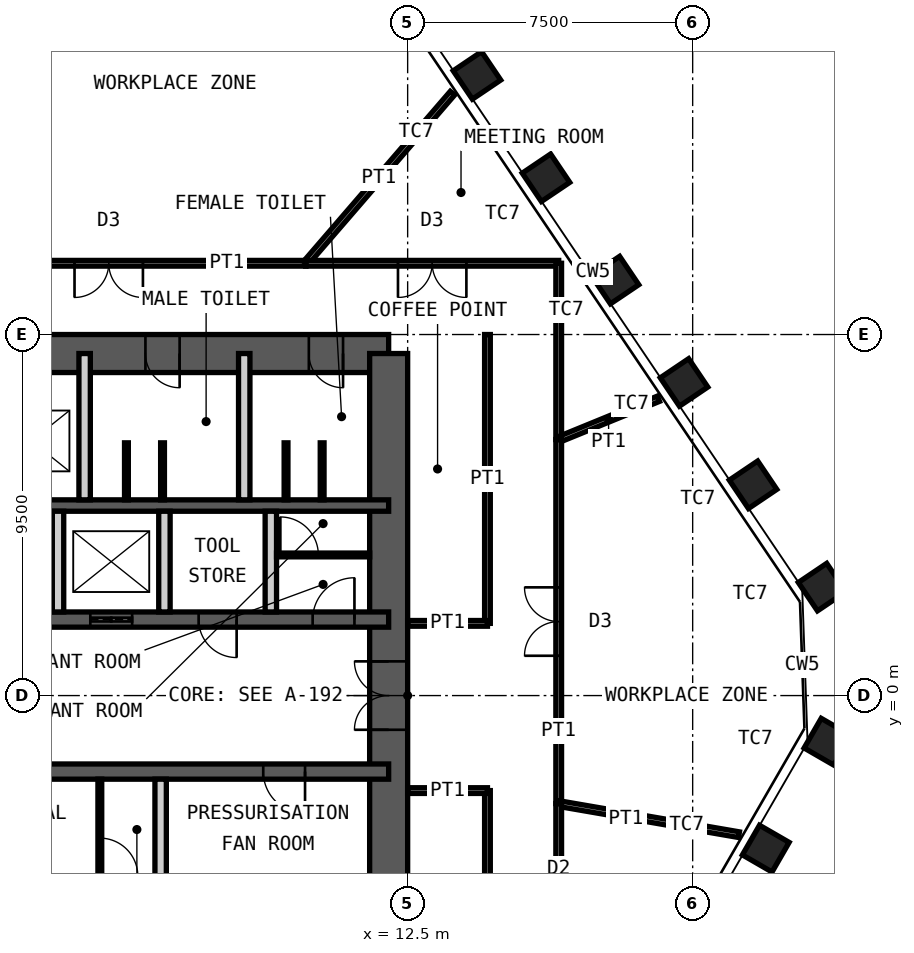
"""IFC4 building model, lengths in metres.
Left out: names, types, materials, properties, quantities, classifications, styles, units other than length and angle.
Written with IfcOpenShell. Run it as: python <this file> out.ifc"""

import sys

from ifc_helpers import new_model, si_unit, direction, frame, frame_2d, origin, origin_2d, place, context, subcontext, project, spatial, rectangle, hollow_rectangle, extrude, element, fill, save


model = new_model("IFC4")
c1 = context("Model", 3, precision=1e-05, world=origin(), true_north=direction((0.0, 1.0)))
c2 = subcontext(c1, "Body", "Model", "MODEL_VIEW")
j1 = project(units=[si_unit("LENGTHUNIT", "METRE"), si_unit("PLANEANGLEUNIT", "RADIAN")], contexts=[c1])
p1 = place(None, origin())
s1 = spatial("IfcSite", under=j1, at=p1, CompositionType="ELEMENT")
p2 = place(p1, origin())
s2 = spatial("IfcBuilding", under=s1, at=p2, CompositionType="ELEMENT")
p3 = place(p2, frame((0.0, 0.0, 266.2)))
s3 = spatial("IfcBuildingStorey", under=s2, at=p3, CompositionType="ELEMENT", Elevation=266.2)
for number, where, z_axis, x_axis in (
    (1, (14.324, 16.318, 0.0), (0.0, 0.0, 1.0), (-0.559, 0.829, 0.0)),
    (2, (16.141, 13.625, 0.0), (0.0, 0.0, 1.0), (-0.559, 0.829, 0.0)),
    (3, (17.957, 10.932, 0.0), (0.0, 0.0, 1.0), (-0.559, 0.829, 0.0)),
    (4, (19.773, 8.239, 0.0), (0.0, 0.0, 1.0), (-0.559, 0.829, 0.0)),
    (5, (21.589, 5.547, 0.0), (0.0, 0.0, 1.0), (-0.559, 0.829, 0.0)),
    (6, (23.406, 2.854, 0.0), (0.0, 0.0, 1.0), (-0.559, 0.829, 0.0)),
    (7, (23.548, -1.214, 0.0), (0.0, 0.0, 1.0), (0.5, 0.866, 0.0)),
    (8, (21.924, -4.027, 0.0), (0.0, 0.0, 1.0), (0.5, 0.866, 0.0)),
):
    element("IfcColumn", number, at=place(p3, frame(where, z_axis=z_axis, x_axis=x_axis)), inside=s3, PredefinedType="COLUMN", context=c2, shape_type="SweptSolid", body=[
        extrude(hollow_rectangle(XDim=0.9, YDim=0.9, WallThickness=0.06, at=origin_2d()), origin(), (0.0, 0.0, 1.0), 4.2),
    ])
p4 = place(p3, frame((-12.0, 9.0, 0.0), z_axis=(0.0, 0.0, 1.0), x_axis=(1.0, 0.0, 0.0)))
e9 = element("IfcWall", 9, at=p4, inside=s3, PredefinedType="SHEAR", context=c2, shape_type="SweptSolid", body=[
    extrude(rectangle(XDim=24.0, YDim=1.0, at=frame_2d((12.0, 0.0))), origin(), (0.0, 0.0, 1.0), 4.2),
])
p5 = place(p4, frame((10.4, 0.0, 0.0)))
e10 = element("IfcOpeningElement", 10, at=p5, cuts=e9, PredefinedType="OPENING", context=c2, shape_type="SweptSolid", body=[
    extrude(rectangle(XDim=1.0, YDim=2.1, at=frame_2d((0.5, 1.05))), frame((0.0, 0.51, 0.0), z_axis=(0.0, -1.0, 0.0), x_axis=(1.0, 0.0, 0.0)), (0.0, 0.0, 1.0), 1.02),
])
p6 = place(p4, frame((17.6, 0.0, 0.0)))
e11 = element("IfcOpeningElement", 11, at=p6, cuts=e9, PredefinedType="OPENING", context=c2, shape_type="SweptSolid", body=[
    extrude(rectangle(XDim=0.9, YDim=2.1, at=frame_2d((0.45, 1.05))), frame((0.0, 0.51, 0.0), z_axis=(0.0, -1.0, 0.0), x_axis=(1.0, 0.0, 0.0)), (0.0, 0.0, 1.0), 1.02),
])
p7 = place(p4, frame((21.9, 0.0, 0.0)))
e12 = element("IfcOpeningElement", 12, at=p7, cuts=e9, PredefinedType="OPENING", context=c2, shape_type="SweptSolid", body=[
    extrude(rectangle(XDim=0.9, YDim=2.1, at=frame_2d((0.45, 1.05))), frame((0.0, 0.51, 0.0), z_axis=(0.0, -1.0, 0.0), x_axis=(1.0, 0.0, 0.0)), (0.0, 0.0, 1.0), 1.02),
])
p8 = place(p3, frame((12.0, -9.0, 0.0), z_axis=(0.0, 0.0, 1.0), x_axis=(0.0, 1.0, 0.0)))
e13 = element("IfcWall", 13, at=p8, inside=s3, PredefinedType="SHEAR", context=c2, shape_type="SweptSolid", body=[
    extrude(rectangle(XDim=18.0, YDim=1.0, at=frame_2d((9.0, 0.0))), origin(), (0.0, 0.0, 1.0), 4.2),
])
p9 = place(p8, frame((8.1, 0.0, 0.0)))
e14 = element("IfcOpeningElement", 14, at=p9, cuts=e13, PredefinedType="OPENING", context=c2, shape_type="SweptSolid", body=[
    extrude(rectangle(XDim=1.8, YDim=2.1, at=frame_2d((0.9, 1.05))), frame((0.0, 0.51, 0.0), z_axis=(0.0, -1.0, 0.0), x_axis=(1.0, 0.0, 0.0)), (0.0, 0.0, 1.0), 1.02),
])
p10 = place(p3, frame((-12.0, 5.0, 0.0), z_axis=(0.0, 0.0, 1.0), x_axis=(1.0, 0.0, 0.0)))
e15 = element("IfcWall", 15, at=p10, inside=s3, PredefinedType="SHEAR", context=c2, shape_type="SweptSolid", body=[
    extrude(rectangle(XDim=24.0, YDim=0.3, at=frame_2d((12.0, 0.0))), origin(), (0.0, 0.0, 1.0), 4.2),
])
p11 = place(p3, frame((-12.0, 2.0, 0.0), z_axis=(0.0, 0.0, 1.0), x_axis=(1.0, 0.0, 0.0)))
e16 = element("IfcWall", 16, at=p11, inside=s3, PredefinedType="SHEAR", context=c2, shape_type="SweptSolid", body=[
    extrude(rectangle(XDim=24.0, YDim=0.4, at=frame_2d((12.0, 0.0))), origin(), (0.0, 0.0, 1.0), 4.2),
])
p12 = place(p11, frame((2.4, 0.0, 0.0)))
e17 = element("IfcOpeningElement", 17, at=p12, cuts=e16, PredefinedType="OPENING", context=c2, shape_type="SweptSolid", body=[
    extrude(rectangle(XDim=1.1, YDim=2.1, at=frame_2d((0.55, 1.05))), frame((0.0, 0.21, 0.0), z_axis=(0.0, -1.0, 0.0), x_axis=(1.0, 0.0, 0.0)), (0.0, 0.0, 1.0), 0.42),
])
p13 = place(p11, frame((22.0, 0.0, 0.0)))
e18 = element("IfcOpeningElement", 18, at=p13, cuts=e16, PredefinedType="OPENING", context=c2, shape_type="SweptSolid", body=[
    extrude(rectangle(XDim=1.1, YDim=2.1, at=frame_2d((0.55, 1.05))), frame((0.0, 0.21, 0.0), z_axis=(0.0, -1.0, 0.0), x_axis=(1.0, 0.0, 0.0)), (0.0, 0.0, 1.0), 0.42),
])
p14 = place(p11, frame((10.15, 0.0, 0.0)))
e19 = element("IfcOpeningElement", 19, at=p14, cuts=e16, PredefinedType="OPENING", context=c2, shape_type="SweptSolid", body=[
    extrude(rectangle(XDim=1.0, YDim=2.1, at=frame_2d((0.5, 1.05))), frame((0.0, 0.21, 0.0), z_axis=(0.0, -1.0, 0.0), x_axis=(1.0, 0.0, 0.0)), (0.0, 0.0, 1.0), 0.42),
])
p15 = place(p11, frame((6.9, 0.0, 0.0)))
e20 = element("IfcOpeningElement", 20, at=p15, cuts=e16, PredefinedType="OPENING", context=c2, shape_type="SweptSolid", body=[
    extrude(rectangle(XDim=1.0, YDim=2.1, at=frame_2d((0.5, 1.05))), frame((0.0, 0.21, 0.0), z_axis=(0.0, -1.0, 0.0), x_axis=(1.0, 0.0, 0.0)), (0.0, 0.0, 1.0), 0.42),
])
p16 = place(p11, frame((13.35, 0.0, 0.0)))
e21 = element("IfcOpeningElement", 21, at=p16, cuts=e16, PredefinedType="OPENING", context=c2, shape_type="SweptSolid", body=[
    extrude(rectangle(XDim=1.1, YDim=2.4, at=frame_2d((0.55, 1.2))), frame((0.0, 0.21, 0.0), z_axis=(0.0, -1.0, 0.0), x_axis=(1.0, 0.0, 0.0)), (0.0, 0.0, 1.0), 0.42),
])
p17 = place(p11, frame((16.15, 0.0, 0.0)))
e22 = element("IfcOpeningElement", 22, at=p17, cuts=e16, PredefinedType="OPENING", context=c2, shape_type="SweptSolid", body=[
    extrude(rectangle(XDim=1.1, YDim=2.4, at=frame_2d((0.55, 1.2))), frame((0.0, 0.21, 0.0), z_axis=(0.0, -1.0, 0.0), x_axis=(1.0, 0.0, 0.0)), (0.0, 0.0, 1.0), 0.42),
])
p18 = place(p11, frame((19.0, 0.0, 0.0)))
e23 = element("IfcOpeningElement", 23, at=p18, cuts=e16, PredefinedType="OPENING", context=c2, shape_type="SweptSolid", body=[
    extrude(rectangle(XDim=1.0, YDim=2.1, at=frame_2d((0.5, 1.05))), frame((0.0, 0.21, 0.0), z_axis=(0.0, -1.0, 0.0), x_axis=(1.0, 0.0, 0.0)), (0.0, 0.0, 1.0), 0.42),
])
p19 = place(p3, frame((-12.0, -2.0, 0.0), z_axis=(0.0, 0.0, 1.0), x_axis=(1.0, 0.0, 0.0)))
e24 = element("IfcWall", 24, at=p19, inside=s3, PredefinedType="SHEAR", context=c2, shape_type="SweptSolid", body=[
    extrude(rectangle(XDim=24.0, YDim=0.4, at=frame_2d((12.0, 0.0))), origin(), (0.0, 0.0, 1.0), 4.2),
])
p20 = place(p19, frame((1.1, 0.0, 0.0)))
e25 = element("IfcOpeningElement", 25, at=p20, cuts=e24, PredefinedType="OPENING", context=c2, shape_type="SweptSolid", body=[
    extrude(rectangle(XDim=1.1, YDim=2.1, at=frame_2d((0.55, 1.05))), frame((0.0, 0.21, 0.0), z_axis=(0.0, -1.0, 0.0), x_axis=(1.0, 0.0, 0.0)), (0.0, 0.0, 1.0), 0.42),
])
p21 = place(p19, frame((13.55, 0.0, 0.0)))
e26 = element("IfcOpeningElement", 26, at=p21, cuts=e24, PredefinedType="OPENING", context=c2, shape_type="SweptSolid", body=[
    extrude(rectangle(XDim=1.1, YDim=2.1, at=frame_2d((0.55, 1.05))), frame((0.0, 0.21, 0.0), z_axis=(0.0, -1.0, 0.0), x_axis=(1.0, 0.0, 0.0)), (0.0, 0.0, 1.0), 0.42),
])
p22 = place(p19, frame((20.7, 0.0, 0.0)))
e27 = element("IfcOpeningElement", 27, at=p22, cuts=e24, PredefinedType="OPENING", context=c2, shape_type="SweptSolid", body=[
    extrude(rectangle(XDim=1.1, YDim=2.1, at=frame_2d((0.55, 1.05))), frame((0.0, 0.21, 0.0), z_axis=(0.0, -1.0, 0.0), x_axis=(1.0, 0.0, 0.0)), (0.0, 0.0, 1.0), 0.42),
])
p23 = place(p19, frame((4.0, 0.0, 0.0)))
e28 = element("IfcOpeningElement", 28, at=p23, cuts=e24, PredefinedType="OPENING", context=c2, shape_type="SweptSolid", body=[
    extrude(rectangle(XDim=1.0, YDim=2.1, at=frame_2d((0.5, 1.05))), frame((0.0, 0.21, 0.0), z_axis=(0.0, -1.0, 0.0), x_axis=(1.0, 0.0, 0.0)), (0.0, 0.0, 1.0), 0.42),
])
p24 = place(p19, frame((6.8, 0.0, 0.0)))
e29 = element("IfcOpeningElement", 29, at=p24, cuts=e24, PredefinedType="OPENING", context=c2, shape_type="SweptSolid", body=[
    extrude(rectangle(XDim=1.0, YDim=2.1, at=frame_2d((0.5, 1.05))), frame((0.0, 0.21, 0.0), z_axis=(0.0, -1.0, 0.0), x_axis=(1.0, 0.0, 0.0)), (0.0, 0.0, 1.0), 0.42),
])
for number, where, z_axis, x_axis in (
    (30, (4.0, 5.15, 0.0), (0.0, 0.0, 1.0), (0.0, 1.0, 0.0)),
    (31, (8.2, 5.15, 0.0), (0.0, 0.0, 1.0), (0.0, 1.0, 0.0)),
):
    element("IfcWall", number, at=place(p3, frame(where, z_axis=z_axis, x_axis=x_axis)), inside=s3, PredefinedType="PARTITIONING", context=c2, shape_type="SweptSolid", body=[
        extrude(rectangle(XDim=3.85, YDim=0.3, at=frame_2d((1.925, 0.0))), origin(), (0.0, 0.0, 1.0), 3.98),
    ])
for number, where, z_axis, x_axis in (
    (32, (3.3, 2.2, 0.0), (0.0, 0.0, 1.0), (0.0, 1.0, 0.0)),
    (33, (6.1, 2.2, 0.0), (0.0, 0.0, 1.0), (0.0, 1.0, 0.0)),
    (34, (8.9, 2.2, 0.0), (0.0, 0.0, 1.0), (0.0, 1.0, 0.0)),
    (35, (6.0, -4.85, 0.0), (0.0, 0.0, 1.0), (0.0, 1.0, 0.0)),
):
    element("IfcWall", number, at=place(p3, frame(where, z_axis=z_axis, x_axis=x_axis)), inside=s3, PredefinedType="PARTITIONING", context=c2, shape_type="SweptSolid", body=[
        extrude(rectangle(XDim=2.65, YDim=0.3, at=frame_2d((1.325, 0.0))), origin(), (0.0, 0.0, 1.0), 3.98),
    ])
p25 = place(p3, frame((4.4, -4.85, 0.0), z_axis=(0.0, 0.0, 1.0), x_axis=(0.0, 1.0, 0.0)))
e36 = element("IfcWall", 36, at=p25, inside=s3, PredefinedType="PARTITIONING", context=c2, shape_type="SweptSolid", body=[
    extrude(rectangle(XDim=2.65, YDim=0.1, at=frame_2d((1.325, 0.0))), origin(), (0.0, 0.0, 1.0), 3.98),
])
p26 = place(p25, frame((0.1, 0.0, 0.0)))
e37 = element("IfcOpeningElement", 37, at=p26, cuts=e36, PredefinedType="OPENING", context=c2, shape_type="SweptSolid", body=[
    extrude(rectangle(XDim=1.0, YDim=2.4, at=frame_2d((0.5, 1.2))), frame((0.0, 0.06, 0.0), z_axis=(0.0, -1.0, 0.0), x_axis=(1.0, 0.0, 0.0)), (0.0, 0.0, 1.0), 0.12),
])
p27 = place(p3, frame((9.05, 3.7, 0.0), z_axis=(0.0, 0.0, 1.0), x_axis=(1.0, 0.0, 0.0)))
e38 = element("IfcWall", 38, at=p27, inside=s3, PredefinedType="PARTITIONING", context=c2, shape_type="SweptSolid", body=[
    extrude(rectangle(XDim=2.45, YDim=0.1, at=frame_2d((1.225, 0.0))), origin(), (0.0, 0.0, 1.0), 3.98),
])
p28 = place(p27, frame((0.1, 0.0, 0.0)))
e39 = element("IfcOpeningElement", 39, at=p28, cuts=e38, PredefinedType="OPENING", context=c2, shape_type="SweptSolid", body=[
    extrude(rectangle(XDim=1.0, YDim=2.4, at=frame_2d((0.5, 1.2))), frame((0.0, 0.06, 0.0), z_axis=(0.0, -1.0, 0.0), x_axis=(1.0, 0.0, 0.0)), (0.0, 0.0, 1.0), 0.12),
])
for number, where, z_axis, x_axis in (
    (40, (5.1, 5.15, 0.0), (0.0, 0.0, 1.0), (0.0, 1.0, 0.0)),
    (41, (6.05, 5.15, 0.0), (0.0, 0.0, 1.0), (0.0, 1.0, 0.0)),
    (42, (9.3, 5.15, 0.0), (0.0, 0.0, 1.0), (0.0, 1.0, 0.0)),
    (43, (10.25, 5.15, 0.0), (0.0, 0.0, 1.0), (0.0, 1.0, 0.0)),
):
    element("IfcWall", number, at=place(p3, frame(where, z_axis=z_axis, x_axis=x_axis)), inside=s3, PredefinedType="PARTITIONING", context=c2, shape_type="SweptSolid", body=[
        extrude(rectangle(XDim=1.5, YDim=0.1, at=frame_2d((0.75, 0.0))), origin(), (0.0, 0.0, 1.0), 2.1),
    ])
p29 = place(p3, frame((-0.548, 11.375, 0.0), z_axis=(0.0, 0.0, 1.0), x_axis=(1.0, 0.0, 0.0)))
e44 = element("IfcWall", 44, at=p29, inside=s3, PredefinedType="PARTITIONING", context=c2, shape_type="SweptSolid", body=[
    extrude(rectangle(XDim=10.365, YDim=0.15, at=frame_2d((5.182, 0.0))), origin(), (0.0, 0.0, 1.0), 4.03),
])
p30 = place(p29, frame((4.282, 0.0, 0.0)))
e45 = element("IfcOpeningElement", 45, at=p30, cuts=e44, PredefinedType="OPENING", context=c2, shape_type="SweptSolid", body=[
    extrude(rectangle(XDim=1.8, YDim=2.4, at=frame_2d((0.9, 1.2))), frame((0.0, 0.085, 0.0), z_axis=(0.0, -1.0, 0.0), x_axis=(1.0, 0.0, 0.0)), (0.0, 0.0, 1.0), 0.17),
])
p31 = place(p3, frame((13.678, 15.85, 0.0), z_axis=(0.0, 0.0, 1.0), x_axis=(-0.653328423077, -0.757074614288, 0.0)))
e46 = element("IfcWall", 46, at=p31, inside=s3, PredefinedType="PARTITIONING", context=c2, shape_type="SweptSolid", body=[
    extrude(rectangle(XDim=5.911, YDim=0.15, at=frame_2d((2.956, 0.0))), origin(), (0.0, 0.0, 1.0), 3.33),
])
p32 = place(p3, frame((9.816, 11.375, 0.0), z_axis=(0.0, 0.0, 1.0), x_axis=(1.0, 0.0, 0.0)))
e47 = element("IfcWall", 47, at=p32, inside=s3, PredefinedType="PARTITIONING", context=c2, shape_type="SweptSolid", body=[
    extrude(rectangle(XDim=6.659, YDim=0.15, at=frame_2d((3.329, 0.0))), origin(), (0.0, 0.0, 1.0), 4.03),
])
p33 = place(p32, frame((2.429, 0.0, 0.0)))
e48 = element("IfcOpeningElement", 48, at=p33, cuts=e47, PredefinedType="OPENING", context=c2, shape_type="SweptSolid", body=[
    extrude(rectangle(XDim=1.8, YDim=2.4, at=frame_2d((0.9, 1.2))), frame((0.0, 0.085, 0.0), z_axis=(0.0, -1.0, 0.0), x_axis=(1.0, 0.0, 0.0)), (0.0, 0.0, 1.0), 0.17),
])
p34 = place(p3, frame((16.475, 11.375, 0.0), z_axis=(0.0, 0.0, 1.0), x_axis=(0.0, -1.0, 0.0)))
e49 = element("IfcWall", 49, at=p34, inside=s3, PredefinedType="PARTITIONING", context=c2, shape_type="SweptSolid", body=[
    extrude(rectangle(XDim=4.638, YDim=0.15, at=frame_2d((2.319, 0.0))), origin(), (0.0, 0.0, 1.0), 4.03),
])
p35 = place(p3, frame((19.1, 7.81, 0.0), z_axis=(0.0, 0.0, 1.0), x_axis=(-0.925593572601, -0.378518874509, 0.0)))
e50 = element("IfcWall", 50, at=p35, inside=s3, PredefinedType="PARTITIONING", context=c2, shape_type="SweptSolid", body=[
    extrude(rectangle(XDim=2.836, YDim=0.15, at=frame_2d((1.418, 0.0))), origin(), (0.0, 0.0, 1.0), 3.33),
])
p36 = place(p3, frame((16.475, 6.737, 0.0), z_axis=(0.0, 0.0, 1.0), x_axis=(0.0, -1.0, 0.0)))
e51 = element("IfcWall", 51, at=p36, inside=s3, PredefinedType="PARTITIONING", context=c2, shape_type="SweptSolid", body=[
    extrude(rectangle(XDim=9.578, YDim=0.15, at=frame_2d((4.789, 0.0))), origin(), (0.0, 0.0, 1.0), 4.03),
])
p37 = place(p36, frame((3.889, 0.0, 0.0)))
e52 = element("IfcOpeningElement", 52, at=p37, cuts=e51, PredefinedType="OPENING", context=c2, shape_type="SweptSolid", body=[
    extrude(rectangle(XDim=1.8, YDim=2.4, at=frame_2d((0.9, 1.2))), frame((0.0, 0.085, 0.0), z_axis=(0.0, -1.0, 0.0), x_axis=(1.0, 0.0, 0.0)), (0.0, 0.0, 1.0), 0.17),
])
p38 = place(p3, frame((21.219, -3.66, 0.0), z_axis=(0.0, 0.0, 1.0), x_axis=(-0.985444592587, 0.16999692627, 0.0)))
e53 = element("IfcWall", 53, at=p38, inside=s3, PredefinedType="PARTITIONING", context=c2, shape_type="SweptSolid", body=[
    extrude(rectangle(XDim=4.814, YDim=0.15, at=frame_2d((2.407, 0.0))), origin(), (0.0, 0.0, 1.0), 4.03),
])
p39 = place(p3, frame((16.475, -2.842, 0.0), z_axis=(0.0, 0.0, 1.0), x_axis=(0.0, -1.0, 0.0)))
e54 = element("IfcWall", 54, at=p39, inside=s3, PredefinedType="PARTITIONING", context=c2, shape_type="SweptSolid", body=[
    extrude(rectangle(XDim=5.64, YDim=0.15, at=frame_2d((2.82, 0.0))), origin(), (0.0, 0.0, 1.0), 4.03),
])
p40 = place(p39, frame((2.32, 0.0, 0.0)))
e55 = element("IfcOpeningElement", 55, at=p40, cuts=e54, PredefinedType="OPENING", context=c2, shape_type="SweptSolid", body=[
    extrude(rectangle(XDim=1.0, YDim=2.4, at=frame_2d((0.5, 1.2))), frame((0.0, 0.085, 0.0), z_axis=(0.0, -1.0, 0.0), x_axis=(1.0, 0.0, 0.0)), (0.0, 0.0, 1.0), 0.17),
])
p41 = place(p3, frame((14.6, 1.9, 0.0), z_axis=(0.0, 0.0, 1.0), x_axis=(0.0, 1.0, 0.0)))
e56 = element("IfcWall", 56, at=p41, inside=s3, PredefinedType="PARTITIONING", context=c2, shape_type="SweptSolid", body=[
    extrude(rectangle(XDim=7.6, YDim=0.15, at=frame_2d((3.8, 0.0))), origin(), (0.0, 0.0, 1.0), 4.03),
])
p42 = place(p3, frame((12.5, 1.9, 0.0), z_axis=(0.0, 0.0, 1.0), x_axis=(1.0, 0.0, 0.0)))
e57 = element("IfcWall", 57, at=p42, inside=s3, PredefinedType="PARTITIONING", context=c2, shape_type="SweptSolid", body=[
    extrude(rectangle(XDim=2.1, YDim=0.15, at=frame_2d((1.05, 0.0))), origin(), (0.0, 0.0, 1.0), 2.93),
])
p43 = place(p3, frame((14.6, -9.5, 0.0), z_axis=(0.0, 0.0, 1.0), x_axis=(0.0, 1.0, 0.0)))
e58 = element("IfcWall", 58, at=p43, inside=s3, PredefinedType="PARTITIONING", context=c2, shape_type="SweptSolid", body=[
    extrude(rectangle(XDim=7.0, YDim=0.15, at=frame_2d((3.5, 0.0))), origin(), (0.0, 0.0, 1.0), 4.03),
])
p44 = place(p3, frame((12.5, -2.5, 0.0), z_axis=(0.0, 0.0, 1.0), x_axis=(1.0, 0.0, 0.0)))
e59 = element("IfcWall", 59, at=p44, inside=s3, PredefinedType="PARTITIONING", context=c2, shape_type="SweptSolid", body=[
    extrude(rectangle(XDim=2.1, YDim=0.15, at=frame_2d((1.05, 0.0))), origin(), (0.0, 0.0, 1.0), 3.33),
])
p45 = place(p6, origin())
e60 = element("IfcDoor", 60, at=p45, inside=s3, OperationType="SINGLE_SWING_RIGHT", PredefinedType="DOOR", context=c2, shape_type="SweptSolid", body=[
    extrude(rectangle(XDim=0.9, YDim=2.1, at=frame_2d((0.45, 1.05))), frame((0.0, 0.025, 0.0), z_axis=(0.0, -1.0, 0.0), x_axis=(1.0, 0.0, 0.0)), (0.0, 0.0, 1.0), 0.05),
])
fill(e11, e60)
p46 = place(p7, origin())
e61 = element("IfcDoor", 61, at=p46, inside=s3, OperationType="SINGLE_SWING_RIGHT", PredefinedType="DOOR", context=c2, shape_type="SweptSolid", body=[
    extrude(rectangle(XDim=0.9, YDim=2.1, at=frame_2d((0.45, 1.05))), frame((0.0, 0.025, 0.0), z_axis=(0.0, -1.0, 0.0), x_axis=(1.0, 0.0, 0.0)), (0.0, 0.0, 1.0), 0.05),
])
fill(e12, e61)
p47 = place(p13, origin())
e62 = element("IfcDoor", 62, at=p47, inside=s3, OperationType="SINGLE_SWING_LEFT", PredefinedType="DOOR", context=c2, shape_type="SweptSolid", body=[
    extrude(rectangle(XDim=1.1, YDim=2.1, at=frame_2d((0.55, 1.05))), frame((0.0, 0.025, 0.0), z_axis=(0.0, -1.0, 0.0), x_axis=(1.0, 0.0, 0.0)), (0.0, 0.0, 1.0), 0.05),
])
fill(e18, e62)
p48 = place(p22, origin())
e63 = element("IfcDoor", 63, at=p48, inside=s3, OperationType="SINGLE_SWING_RIGHT", PredefinedType="DOOR", context=c2, shape_type="SweptSolid", body=[
    extrude(rectangle(XDim=1.1, YDim=2.1, at=frame_2d((0.55, 1.05))), frame((0.0, 0.025, 0.0), z_axis=(0.0, -1.0, 0.0), x_axis=(1.0, 0.0, 0.0)), (0.0, 0.0, 1.0), 0.05),
])
fill(e27, e63)
p49 = place(p9, origin())
e64 = element("IfcDoor", 64, at=p49, inside=s3, OperationType="DOUBLE_DOOR_DOUBLE_SWING", PredefinedType="DOOR", context=c2, shape_type="SweptSolid", body=[
    extrude(rectangle(XDim=1.8, YDim=2.1, at=frame_2d((0.9, 1.05))), frame((0.0, 0.025, 0.0), z_axis=(0.0, -1.0, 0.0), x_axis=(1.0, 0.0, 0.0)), (0.0, 0.0, 1.0), 0.05),
])
fill(e14, e64)
p50 = place(p17, origin())
e65 = element("IfcDoor", 65, at=p50, inside=s3, OperationType="DOUBLE_DOOR_SLIDING", PredefinedType="DOOR", context=c2, shape_type="SweptSolid", body=[
    extrude(rectangle(XDim=1.1, YDim=2.4, at=frame_2d((0.55, 1.2))), frame((0.0, 0.025, 0.0), z_axis=(0.0, -1.0, 0.0), x_axis=(1.0, 0.0, 0.0)), (0.0, 0.0, 1.0), 0.05),
])
fill(e22, e65)
p51 = place(p18, origin())
e66 = element("IfcDoor", 66, at=p51, inside=s3, OperationType="SINGLE_SWING_RIGHT", PredefinedType="DOOR", context=c2, shape_type="SweptSolid", body=[
    extrude(rectangle(XDim=1.0, YDim=2.1, at=frame_2d((0.5, 1.05))), frame((0.0, 0.025, 0.0), z_axis=(0.0, -1.0, 0.0), x_axis=(1.0, 0.0, 0.0)), (0.0, 0.0, 1.0), 0.05),
])
fill(e23, e66)
p52 = place(p26, origin())
e67 = element("IfcDoor", 67, at=p52, inside=s3, OperationType="SINGLE_SWING_LEFT", PredefinedType="DOOR", context=c2, shape_type="SweptSolid", body=[
    extrude(rectangle(XDim=1.0, YDim=2.4, at=frame_2d((0.5, 1.2))), frame((0.0, 0.025, 0.0), z_axis=(0.0, -1.0, 0.0), x_axis=(1.0, 0.0, 0.0)), (0.0, 0.0, 1.0), 0.05),
])
fill(e37, e67)
p53 = place(p28, origin())
e68 = element("IfcDoor", 68, at=p53, inside=s3, OperationType="SINGLE_SWING_RIGHT", PredefinedType="DOOR", context=c2, shape_type="SweptSolid", body=[
    extrude(rectangle(XDim=1.0, YDim=2.4, at=frame_2d((0.5, 1.2))), frame((0.0, 0.025, 0.0), z_axis=(0.0, -1.0, 0.0), x_axis=(1.0, 0.0, 0.0)), (0.0, 0.0, 1.0), 0.05),
])
fill(e39, e68)
p54 = place(p30, origin())
e69 = element("IfcDoor", 69, at=p54, inside=s3, OperationType="DOUBLE_DOOR_DOUBLE_SWING", PredefinedType="DOOR", context=c2, shape_type="SweptSolid", body=[
    extrude(rectangle(XDim=1.8, YDim=2.4, at=frame_2d((0.9, 1.2))), frame((0.0, 0.025, 0.0), z_axis=(0.0, -1.0, 0.0), x_axis=(1.0, 0.0, 0.0)), (0.0, 0.0, 1.0), 0.05),
])
fill(e45, e69)
p55 = place(p33, origin())
e70 = element("IfcDoor", 70, at=p55, inside=s3, OperationType="DOUBLE_DOOR_DOUBLE_SWING", PredefinedType="DOOR", context=c2, shape_type="SweptSolid", body=[
    extrude(rectangle(XDim=1.8, YDim=2.4, at=frame_2d((0.9, 1.2))), frame((0.0, 0.025, 0.0), z_axis=(0.0, -1.0, 0.0), x_axis=(1.0, 0.0, 0.0)), (0.0, 0.0, 1.0), 0.05),
])
fill(e48, e70)
p56 = place(p37, origin())
e71 = element("IfcDoor", 71, at=p56, inside=s3, OperationType="DOUBLE_DOOR_DOUBLE_SWING", PredefinedType="DOOR", context=c2, shape_type="SweptSolid", body=[
    extrude(rectangle(XDim=1.8, YDim=2.4, at=frame_2d((0.9, 1.2))), frame((0.0, 0.025, 0.0), z_axis=(0.0, -1.0, 0.0), x_axis=(1.0, 0.0, 0.0)), (0.0, 0.0, 1.0), 0.05),
])
fill(e52, e71)
save(model, sys.argv[1])
